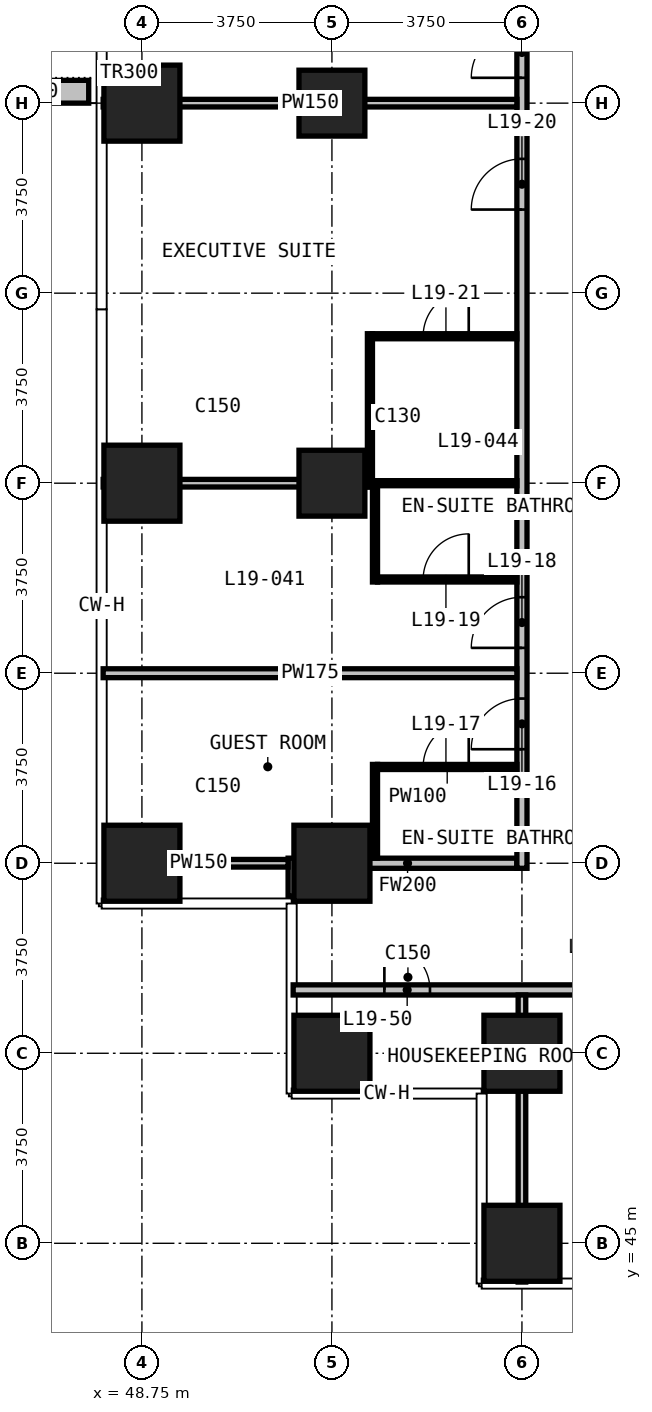
"""IFC4 building model, lengths in metres.
Left out: names, types, materials, properties, quantities, classifications, styles, units other than length and angle.
Written with IfcOpenShell. Run it as: python <this file> out.ifc"""

import sys

from ifc_helpers import new_model, si_unit, direction, frame, frame_2d, origin, origin_2d, place, context, subcontext, project, spatial, rectangle, extrude, element, fill, save


model = new_model("IFC4")
c1 = context("Model", 3, precision=1e-05, world=origin(), true_north=direction((0.0, 1.0)))
c2 = subcontext(c1, "Body", "Model", "MODEL_VIEW")
j1 = project(units=[si_unit("LENGTHUNIT", "METRE"), si_unit("PLANEANGLEUNIT", "RADIAN")], contexts=[c1])
p1 = place(None, origin())
s1 = spatial("IfcSite", under=j1, at=p1, CompositionType="ELEMENT")
p2 = place(p1, origin())
s2 = spatial("IfcBuilding", under=s1, at=p2, CompositionType="ELEMENT")
p3 = place(p2, frame((0.0, 0.0, 82.4)))
s3 = spatial("IfcBuildingStorey", under=s2, at=p3, CompositionType="ELEMENT", Elevation=82.4)
for number, where, z_axis, x_axis in (
    (1, (48.75, 52.5, 0.0), (0.0, 0.0, 1.0), (1.0, 0.0, 0.0)),
    (2, (48.75, 60.0, 0.0), (0.0, 0.0, 1.0), (1.0, 0.0, 0.0)),
    (3, (48.75, 67.5, 0.0), (0.0, 0.0, 1.0), (1.0, 0.0, 0.0)),
    (4, (52.5, 48.75, 0.0), (0.0, 0.0, 1.0), (1.0, 0.0, 0.0)),
    (5, (52.5, 52.5, 0.0), (0.0, 0.0, 1.0), (1.0, 0.0, 0.0)),
):
    element("IfcColumn", number, at=place(p3, frame(where, z_axis=z_axis, x_axis=x_axis)), inside=s3, PredefinedType="COLUMN", context=c2, shape_type="SweptSolid", body=[
        extrude(rectangle(XDim=1.5, YDim=1.5, at=origin_2d()), origin(), (0.0, 0.0, 1.0), 3.3),
    ])
for number, where, z_axis, x_axis in (
    (6, (52.5, 60.0, 0.0), (0.0, 0.0, 1.0), (1.0, 0.0, 0.0)),
    (7, (52.5, 67.5, 0.0), (0.0, 0.0, 1.0), (1.0, 0.0, 0.0)),
):
    element("IfcColumn", number, at=place(p3, frame(where, z_axis=z_axis, x_axis=x_axis)), inside=s3, PredefinedType="COLUMN", context=c2, shape_type="SweptSolid", body=[
        extrude(rectangle(XDim=1.3, YDim=1.3, at=origin_2d()), origin(), (0.0, 0.0, 1.0), 3.3),
    ])
for number, where, z_axis, x_axis in (
    (8, (56.25, 45.0, 0.0), (0.0, 0.0, 1.0), (1.0, 0.0, 0.0)),
    (9, (56.25, 48.75, 0.0), (0.0, 0.0, 1.0), (1.0, 0.0, 0.0)),
):
    element("IfcColumn", number, at=place(p3, frame(where, z_axis=z_axis, x_axis=x_axis)), inside=s3, PredefinedType="COLUMN", context=c2, shape_type="SweptSolid", body=[
        extrude(rectangle(XDim=1.5, YDim=1.5, at=origin_2d()), origin(), (0.0, 0.0, 1.0), 3.3),
    ])
p4 = place(p3, frame((47.7, 67.725, 0.0), z_axis=(0.0, 0.0, 1.0), x_axis=(-1.0, 0.0, 0.0)))
e10 = element("IfcWall", 10, at=p4, inside=s3, PredefinedType="USERDEFINED", context=c2, shape_type="SweptSolid", body=[
    extrude(rectangle(XDim=2.35, YDim=0.45, at=frame_2d((1.175, 0.0))), origin(), (0.0, 0.0, 1.0), 1.1),
])
p5 = place(p3, frame((51.735, 50.0, 0.0), z_axis=(0.0, 0.0, 1.0), x_axis=(1.0, 0.0, 0.0)))
e11 = element("IfcWall", 11, at=p5, inside=s3, PredefinedType="PARTITIONING", context=c2, shape_type="SweptSolid", body=[
    extrude(rectangle(XDim=46.53, YDim=0.2, at=frame_2d((23.265, 0.0))), origin(), (0.0, 0.0, 1.0), 3.0),
])
p6 = place(p5, frame((5.615, 0.0, 0.0)))
e12 = element("IfcOpeningElement", 12, at=p6, cuts=e11, PredefinedType="OPENING", context=c2, shape_type="SweptSolid", body=[
    extrude(rectangle(XDim=1.0, YDim=2.2, at=frame_2d((0.5, 1.1))), frame((0.0, 0.11, 0.0), z_axis=(0.0, -1.0, 0.0), x_axis=(1.0, 0.0, 0.0)), (0.0, 0.0, 1.0), 0.22),
])
p7 = place(p5, frame((17.415, 0.0, 0.0)))
e13 = element("IfcOpeningElement", 13, at=p7, cuts=e11, PredefinedType="OPENING", context=c2, shape_type="SweptSolid", body=[
    extrude(rectangle(XDim=1.0, YDim=2.2, at=frame_2d((0.5, 1.1))), frame((0.0, 0.11, 0.0), z_axis=(0.0, -1.0, 0.0), x_axis=(1.0, 0.0, 0.0)), (0.0, 0.0, 1.0), 0.22),
])
p8 = place(p5, frame((20.615, 0.0, 0.0)))
e14 = element("IfcOpeningElement", 14, at=p8, cuts=e11, PredefinedType="OPENING", context=c2, shape_type="SweptSolid", body=[
    extrude(rectangle(XDim=1.0, YDim=2.2, at=frame_2d((0.5, 1.1))), frame((0.0, 0.11, 0.0), z_axis=(0.0, -1.0, 0.0), x_axis=(1.0, 0.0, 0.0)), (0.0, 0.0, 1.0), 0.22),
])
p9 = place(p5, frame((32.415, 0.0, 0.0)))
e15 = element("IfcOpeningElement", 15, at=p9, cuts=e11, PredefinedType="OPENING", context=c2, shape_type="SweptSolid", body=[
    extrude(rectangle(XDim=1.0, YDim=2.2, at=frame_2d((0.5, 1.1))), frame((0.0, 0.11, 0.0), z_axis=(0.0, -1.0, 0.0), x_axis=(1.0, 0.0, 0.0)), (0.0, 0.0, 1.0), 0.22),
])
p10 = place(p5, frame((35.615, 0.0, 0.0)))
e16 = element("IfcOpeningElement", 16, at=p10, cuts=e11, PredefinedType="OPENING", context=c2, shape_type="SweptSolid", body=[
    extrude(rectangle(XDim=1.0, YDim=2.2, at=frame_2d((0.5, 1.1))), frame((0.0, 0.11, 0.0), z_axis=(0.0, -1.0, 0.0), x_axis=(1.0, 0.0, 0.0)), (0.0, 0.0, 1.0), 0.22),
])
p11 = place(p5, frame((1.8, 0.0, 0.0)))
e17 = element("IfcOpeningElement", 17, at=p11, cuts=e11, PredefinedType="OPENING", context=c2, shape_type="SweptSolid", body=[
    extrude(rectangle(XDim=0.9, YDim=2.2, at=frame_2d((0.45, 1.1))), frame((0.0, 0.11, 0.0), z_axis=(0.0, -1.0, 0.0), x_axis=(1.0, 0.0, 0.0)), (0.0, 0.0, 1.0), 0.22),
])
p12 = place(p5, frame((43.815, 0.0, 0.0)))
e18 = element("IfcOpeningElement", 18, at=p12, cuts=e11, PredefinedType="OPENING", context=c2, shape_type="SweptSolid", body=[
    extrude(rectangle(XDim=0.9, YDim=2.2, at=frame_2d((0.45, 1.1))), frame((0.0, 0.11, 0.0), z_axis=(0.0, -1.0, 0.0), x_axis=(1.0, 0.0, 0.0)), (0.0, 0.0, 1.0), 0.22),
])
p13 = place(p3, frame((51.835, 52.5, 0.0), z_axis=(0.0, 0.0, 1.0), x_axis=(1.0, 0.0, 0.0)))
e19 = element("IfcWall", 19, at=p13, inside=s3, PredefinedType="PARTITIONING", context=c2, shape_type="SweptSolid", body=[
    extrude(rectangle(XDim=4.315, YDim=0.2, at=frame_2d((2.157, 0.0))), origin(), (0.0, 0.0, 1.0), 3.0),
])
p14 = place(p3, frame((51.735, 51.855, 0.0), z_axis=(0.0, 0.0, 1.0), x_axis=(0.0, 1.0, 0.0)))
e20 = element("IfcWall", 20, at=p14, inside=s3, PredefinedType="PARTITIONING", context=c2, shape_type="SweptSolid", body=[
    extrude(rectangle(XDim=0.745, YDim=0.2, at=frame_2d((0.373, 0.0))), origin(), (0.0, 0.0, 1.0), 3.0),
])
p15 = place(p3, frame((56.25, 52.4, 0.0), z_axis=(0.0, 0.0, 1.0), x_axis=(0.0, 1.0, 0.0)))
e21 = element("IfcWall", 21, at=p15, inside=s3, PredefinedType="PARTITIONING", context=c2, shape_type="SweptSolid", body=[
    extrude(rectangle(XDim=38.31, YDim=0.2, at=frame_2d((19.155, 0.0))), origin(), (0.0, 0.0, 1.0), 3.0),
])
p16 = place(p15, frame((2.35, 0.0, 0.0)))
e22 = element("IfcOpeningElement", 22, at=p16, cuts=e21, PredefinedType="OPENING", context=c2, shape_type="SweptSolid", body=[
    extrude(rectangle(XDim=1.0, YDim=2.2, at=frame_2d((0.5, 1.1))), frame((0.0, 0.11, 0.0), z_axis=(0.0, -1.0, 0.0), x_axis=(1.0, 0.0, 0.0)), (0.0, 0.0, 1.0), 0.22),
])
p17 = place(p15, frame((4.35, 0.0, 0.0)))
e23 = element("IfcOpeningElement", 23, at=p17, cuts=e21, PredefinedType="OPENING", context=c2, shape_type="SweptSolid", body=[
    extrude(rectangle(XDim=1.0, YDim=2.2, at=frame_2d((0.5, 1.1))), frame((0.0, 0.11, 0.0), z_axis=(0.0, -1.0, 0.0), x_axis=(1.0, 0.0, 0.0)), (0.0, 0.0, 1.0), 0.22),
])
p18 = place(p15, frame((13.0, 0.0, 0.0)))
e24 = element("IfcOpeningElement", 24, at=p18, cuts=e21, PredefinedType="OPENING", context=c2, shape_type="SweptSolid", body=[
    extrude(rectangle(XDim=1.0, YDim=2.2, at=frame_2d((0.5, 1.1))), frame((0.0, 0.11, 0.0), z_axis=(0.0, -1.0, 0.0), x_axis=(1.0, 0.0, 0.0)), (0.0, 0.0, 1.0), 0.22),
])
p19 = place(p15, frame((15.6, 0.0, 0.0)))
e25 = element("IfcOpeningElement", 25, at=p19, cuts=e21, PredefinedType="OPENING", context=c2, shape_type="SweptSolid", body=[
    extrude(rectangle(XDim=1.0, YDim=2.2, at=frame_2d((0.5, 1.1))), frame((0.0, 0.11, 0.0), z_axis=(0.0, -1.0, 0.0), x_axis=(1.0, 0.0, 0.0)), (0.0, 0.0, 1.0), 0.22),
])
p20 = place(p15, frame((21.1, 0.0, 0.0)))
e26 = element("IfcOpeningElement", 26, at=p20, cuts=e21, PredefinedType="OPENING", context=c2, shape_type="SweptSolid", body=[
    extrude(rectangle(XDim=1.0, YDim=2.2, at=frame_2d((0.5, 1.1))), frame((0.0, 0.11, 0.0), z_axis=(0.0, -1.0, 0.0), x_axis=(1.0, 0.0, 0.0)), (0.0, 0.0, 1.0), 0.22),
])
p21 = place(p15, frame((23.7, 0.0, 0.0)))
e27 = element("IfcOpeningElement", 27, at=p21, cuts=e21, PredefinedType="OPENING", context=c2, shape_type="SweptSolid", body=[
    extrude(rectangle(XDim=1.0, YDim=2.2, at=frame_2d((0.5, 1.1))), frame((0.0, 0.11, 0.0), z_axis=(0.0, -1.0, 0.0), x_axis=(1.0, 0.0, 0.0)), (0.0, 0.0, 1.0), 0.22),
])
p22 = place(p15, frame((31.55, 0.0, 0.0)))
e28 = element("IfcOpeningElement", 28, at=p22, cuts=e21, PredefinedType="OPENING", context=c2, shape_type="SweptSolid", body=[
    extrude(rectangle(XDim=0.9, YDim=2.2, at=frame_2d((0.45, 1.1))), frame((0.0, 0.11, 0.0), z_axis=(0.0, -1.0, 0.0), x_axis=(1.0, 0.0, 0.0)), (0.0, 0.0, 1.0), 0.22),
])
p23 = place(p15, frame((35.65, 0.0, 0.0)))
e29 = element("IfcOpeningElement", 29, at=p23, cuts=e21, PredefinedType="OPENING", context=c2, shape_type="SweptSolid", body=[
    extrude(rectangle(XDim=0.9, YDim=2.2, at=frame_2d((0.45, 1.1))), frame((0.0, 0.11, 0.0), z_axis=(0.0, -1.0, 0.0), x_axis=(1.0, 0.0, 0.0)), (0.0, 0.0, 1.0), 0.22),
])
p24 = place(p3, frame((47.985, 56.25, 0.0), z_axis=(0.0, 0.0, 1.0), x_axis=(1.0, 0.0, 0.0)))
e30 = element("IfcWall", 30, at=p24, inside=s3, PredefinedType="PARTITIONING", context=c2, shape_type="SweptSolid", body=[
    extrude(rectangle(XDim=8.165, YDim=0.175, at=frame_2d((4.083, 0.0))), origin(), (0.0, 0.0, 1.0), 3.0),
])
p25 = place(p3, frame((48.105, 52.5, 0.0), z_axis=(0.0, 0.0, 1.0), x_axis=(1.0, 0.0, 0.0)))
e31 = element("IfcWall", 31, at=p25, inside=s3, PredefinedType="PARTITIONING", context=c2, shape_type="SweptSolid", body=[
    extrude(rectangle(XDim=3.53, YDim=0.15, at=frame_2d((1.765, 0.0))), origin(), (0.0, 0.0, 1.0), 3.0),
])
p26 = place(p3, frame((47.985, 60.0, 0.0), z_axis=(0.0, 0.0, 1.0), x_axis=(1.0, 0.0, 0.0)))
e32 = element("IfcWall", 32, at=p26, inside=s3, PredefinedType="PARTITIONING", context=c2, shape_type="SweptSolid", body=[
    extrude(rectangle(XDim=5.215, YDim=0.15, at=frame_2d((2.607, 0.0))), origin(), (0.0, 0.0, 1.0), 3.0),
])
p27 = place(p3, frame((47.985, 67.5, 0.0), z_axis=(0.0, 0.0, 1.0), x_axis=(1.0, 0.0, 0.0)))
e33 = element("IfcWall", 33, at=p27, inside=s3, PredefinedType="PARTITIONING", context=c2, shape_type="SweptSolid", body=[
    extrude(rectangle(XDim=8.165, YDim=0.15, at=frame_2d((4.083, 0.0))), origin(), (0.0, 0.0, 1.0), 3.0),
])
p28 = place(p3, frame((56.25, 44.235, 0.0), z_axis=(0.0, 0.0, 1.0), x_axis=(0.0, 1.0, 0.0)))
e34 = element("IfcWall", 34, at=p28, inside=s3, PredefinedType="PARTITIONING", context=c2, shape_type="SweptSolid", body=[
    extrude(rectangle(XDim=5.665, YDim=0.15, at=frame_2d((2.833, 0.0))), origin(), (0.0, 0.0, 1.0), 3.0),
])
p29 = place(p3, frame((53.4, 54.4, 0.0), z_axis=(0.0, 0.0, 1.0), x_axis=(1.0, 0.0, 0.0)))
e35 = element("IfcWall", 35, at=p29, inside=s3, PredefinedType="PARTITIONING", context=c2, shape_type="SweptSolid", body=[
    extrude(rectangle(XDim=2.75, YDim=0.1, at=frame_2d((1.375, 0.0))), origin(), (0.0, 0.0, 1.0), 3.0),
])
p30 = place(p29, frame((0.9, 0.0, 0.0)))
e36 = element("IfcOpeningElement", 36, at=p30, cuts=e35, PredefinedType="OPENING", context=c2, shape_type="SweptSolid", body=[
    extrude(rectangle(XDim=0.9, YDim=2.2, at=frame_2d((0.45, 1.1))), frame((0.0, 0.06, 0.0), z_axis=(0.0, -1.0, 0.0), x_axis=(1.0, 0.0, 0.0)), (0.0, 0.0, 1.0), 0.12),
])
p31 = place(p3, frame((53.4, 58.1, 0.0), z_axis=(0.0, 0.0, 1.0), x_axis=(1.0, 0.0, 0.0)))
e37 = element("IfcWall", 37, at=p31, inside=s3, PredefinedType="PARTITIONING", context=c2, shape_type="SweptSolid", body=[
    extrude(rectangle(XDim=2.75, YDim=0.1, at=frame_2d((1.375, 0.0))), origin(), (0.0, 0.0, 1.0), 3.0),
])
p32 = place(p31, frame((0.9, 0.0, 0.0)))
e38 = element("IfcOpeningElement", 38, at=p32, cuts=e37, PredefinedType="OPENING", context=c2, shape_type="SweptSolid", body=[
    extrude(rectangle(XDim=0.9, YDim=2.2, at=frame_2d((0.45, 1.1))), frame((0.0, 0.06, 0.0), z_axis=(0.0, -1.0, 0.0), x_axis=(1.0, 0.0, 0.0)), (0.0, 0.0, 1.0), 0.12),
])
p33 = place(p3, frame((53.4, 60.0, 0.0), z_axis=(0.0, 0.0, 1.0), x_axis=(1.0, 0.0, 0.0)))
e39 = element("IfcWall", 39, at=p33, inside=s3, PredefinedType="PARTITIONING", context=c2, shape_type="SweptSolid", body=[
    extrude(rectangle(XDim=2.75, YDim=0.1, at=frame_2d((1.375, 0.0))), origin(), (0.0, 0.0, 1.0), 3.0),
])
p34 = place(p3, frame((53.3, 62.9, 0.0), z_axis=(0.0, 0.0, 1.0), x_axis=(1.0, 0.0, 0.0)))
e40 = element("IfcWall", 40, at=p34, inside=s3, PredefinedType="PARTITIONING", context=c2, shape_type="SweptSolid", body=[
    extrude(rectangle(XDim=2.85, YDim=0.1, at=frame_2d((1.425, 0.0))), origin(), (0.0, 0.0, 1.0), 3.0),
])
p35 = place(p34, frame((1.0, 0.0, 0.0)))
e41 = element("IfcOpeningElement", 41, at=p35, cuts=e40, PredefinedType="OPENING", context=c2, shape_type="SweptSolid", body=[
    extrude(rectangle(XDim=0.9, YDim=2.2, at=frame_2d((0.45, 1.1))), frame((0.0, 0.06, 0.0), z_axis=(0.0, -1.0, 0.0), x_axis=(1.0, 0.0, 0.0)), (0.0, 0.0, 1.0), 0.12),
])
p36 = place(p3, frame((53.25, 59.925, 0.0), z_axis=(0.0, 0.0, 1.0), x_axis=(0.0, 1.0, 0.0)))
e42 = element("IfcWall", 42, at=p36, inside=s3, PredefinedType="PARTITIONING", context=c2, shape_type="SweptSolid", body=[
    extrude(rectangle(XDim=3.025, YDim=0.1, at=frame_2d((1.512, 0.0))), origin(), (0.0, 0.0, 1.0), 3.0),
])
p37 = place(p3, frame((53.35, 52.6, 0.0), z_axis=(0.0, 0.0, 1.0), x_axis=(0.0, 1.0, 0.0)))
e43 = element("IfcWall", 43, at=p37, inside=s3, PredefinedType="PARTITIONING", context=c2, shape_type="SweptSolid", body=[
    extrude(rectangle(XDim=1.85, YDim=0.1, at=frame_2d((0.925, 0.0))), origin(), (0.0, 0.0, 1.0), 3.0),
])
p38 = place(p3, frame((53.35, 58.05, 0.0), z_axis=(0.0, 0.0, 1.0), x_axis=(0.0, 1.0, 0.0)))
e44 = element("IfcWall", 44, at=p38, inside=s3, PredefinedType="PARTITIONING", context=c2, shape_type="SweptSolid", body=[
    extrude(rectangle(XDim=2.0, YDim=0.1, at=frame_2d((1.0, 0.0))), origin(), (0.0, 0.0, 1.0), 3.0),
])
p39 = place(p16, origin())
e45 = element("IfcDoor", 45, at=p39, inside=s3, OperationType="SINGLE_SWING_LEFT", PredefinedType="DOOR", context=c2, shape_type="SweptSolid", body=[
    extrude(rectangle(XDim=1.0, YDim=2.2, at=frame_2d((0.5, 1.1))), frame((0.0, 0.025, 0.0), z_axis=(0.0, -1.0, 0.0), x_axis=(1.0, 0.0, 0.0)), (0.0, 0.0, 1.0), 0.05),
])
fill(e22, e45)
p40 = place(p30, origin())
e46 = element("IfcDoor", 46, at=p40, inside=s3, OperationType="SINGLE_SWING_RIGHT", PredefinedType="DOOR", context=c2, shape_type="SweptSolid", body=[
    extrude(rectangle(XDim=0.9, YDim=2.2, at=frame_2d((0.45, 1.1))), frame((0.0, 0.025, 0.0), z_axis=(0.0, -1.0, 0.0), x_axis=(1.0, 0.0, 0.0)), (0.0, 0.0, 1.0), 0.05),
])
fill(e36, e46)
p41 = place(p17, origin())
e47 = element("IfcDoor", 47, at=p41, inside=s3, OperationType="SINGLE_SWING_LEFT", PredefinedType="DOOR", context=c2, shape_type="SweptSolid", body=[
    extrude(rectangle(XDim=1.0, YDim=2.2, at=frame_2d((0.5, 1.1))), frame((0.0, 0.025, 0.0), z_axis=(0.0, -1.0, 0.0), x_axis=(1.0, 0.0, 0.0)), (0.0, 0.0, 1.0), 0.05),
])
fill(e23, e47)
p42 = place(p32, origin())
e48 = element("IfcDoor", 48, at=p42, inside=s3, OperationType="SINGLE_SWING_RIGHT", PredefinedType="DOOR", context=c2, shape_type="SweptSolid", body=[
    extrude(rectangle(XDim=0.9, YDim=2.2, at=frame_2d((0.45, 1.1))), frame((0.0, 0.025, 0.0), z_axis=(0.0, -1.0, 0.0), x_axis=(1.0, 0.0, 0.0)), (0.0, 0.0, 1.0), 0.05),
])
fill(e38, e48)
p43 = place(p18, origin())
e49 = element("IfcDoor", 49, at=p43, inside=s3, OperationType="SINGLE_SWING_RIGHT", PredefinedType="DOOR", context=c2, shape_type="SweptSolid", body=[
    extrude(rectangle(XDim=1.0, YDim=2.2, at=frame_2d((0.5, 1.1))), frame((0.0, 0.025, 0.0), z_axis=(0.0, -1.0, 0.0), x_axis=(1.0, 0.0, 0.0)), (0.0, 0.0, 1.0), 0.05),
])
fill(e24, e49)
p44 = place(p35, origin())
e50 = element("IfcDoor", 50, at=p44, inside=s3, OperationType="SINGLE_SWING_RIGHT", PredefinedType="DOOR", context=c2, shape_type="SweptSolid", body=[
    extrude(rectangle(XDim=0.9, YDim=2.2, at=frame_2d((0.45, 1.1))), frame((0.0, 0.025, 0.0), z_axis=(0.0, -1.0, 0.0), x_axis=(1.0, 0.0, 0.0)), (0.0, 0.0, 1.0), 0.05),
])
fill(e41, e50)
p45 = place(p19, origin())
e51 = element("IfcDoor", 51, at=p45, inside=s3, OperationType="SINGLE_SWING_RIGHT", PredefinedType="DOOR", context=c2, shape_type="SweptSolid", body=[
    extrude(rectangle(XDim=1.0, YDim=2.2, at=frame_2d((0.5, 1.1))), frame((0.0, 0.025, 0.0), z_axis=(0.0, -1.0, 0.0), x_axis=(1.0, 0.0, 0.0)), (0.0, 0.0, 1.0), 0.05),
])
fill(e25, e51)
p46 = place(p11, origin())
e52 = element("IfcDoor", 52, at=p46, inside=s3, OperationType="SINGLE_SWING_LEFT", PredefinedType="DOOR", context=c2, shape_type="SweptSolid", body=[
    extrude(rectangle(XDim=0.9, YDim=2.2, at=frame_2d((0.45, 1.1))), frame((0.0, 0.025, 0.0), z_axis=(0.0, -1.0, 0.0), x_axis=(1.0, 0.0, 0.0)), (0.0, 0.0, 1.0), 0.05),
])
fill(e17, e52)
save(model, sys.argv[1])
